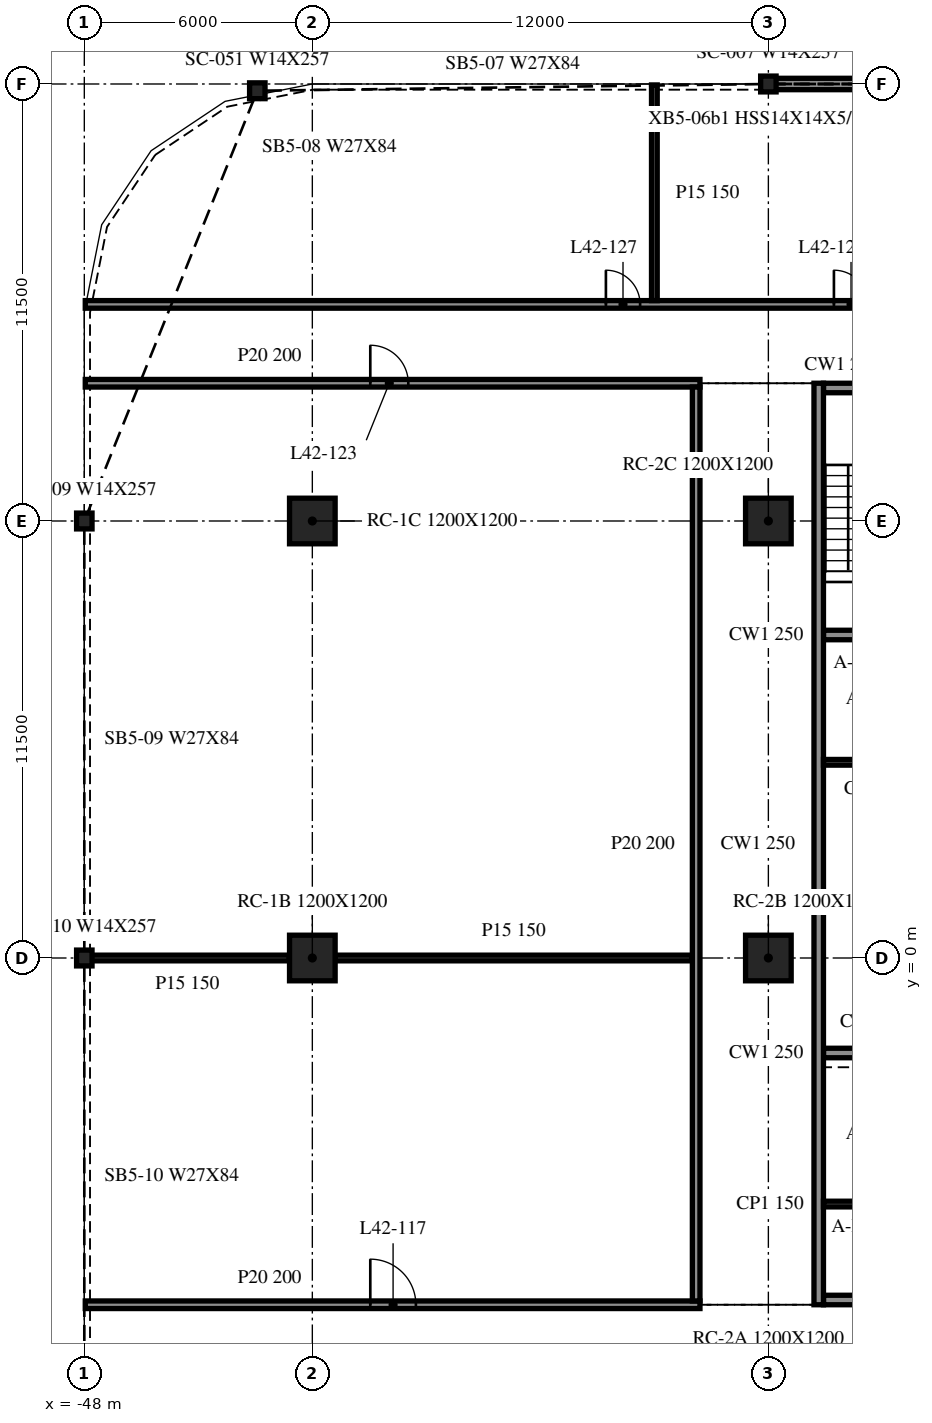
"""IFC4 building model, lengths in metres.
Left out: names, types, materials, properties, quantities, classifications, styles, units other than length and angle.
Written with IfcOpenShell. Run it as: python <this file> out.ifc"""

import sys

from ifc_helpers import new_model, si_unit, direction, frame, frame_2d, origin, origin_2d, place, context, subcontext, project, spatial, rectangle, i_section, extrude, element, fill, save


model = new_model("IFC4")
c1 = context("Model", 3, precision=1e-05, world=origin(), true_north=direction((0.0, 1.0)))
c2 = subcontext(c1, "Body", "Model", "MODEL_VIEW")
j1 = project(units=[si_unit("LENGTHUNIT", "METRE"), si_unit("PLANEANGLEUNIT", "RADIAN")], contexts=[c1])
p1 = place(None, origin())
s1 = spatial("IfcSite", under=j1, at=p1, CompositionType="ELEMENT")
p2 = place(p1, origin())
s2 = spatial("IfcBuilding", under=s1, at=p2, CompositionType="ELEMENT")
p3 = place(p2, frame((0.0, 0.0, 178.2)))
s3 = spatial("IfcBuildingStorey", under=s2, at=p3, CompositionType="ELEMENT", Elevation=178.2)
for number, where, z_axis, x_axis in (
    (1, (-42.0, 0.0, -0.34), (0.0, 0.0, 1.0), (1.0, 0.0, 0.0)),
    (2, (-42.0, 11.5, -0.34), (0.0, 0.0, 1.0), (1.0, 0.0, 0.0)),
    (3, (-30.0, 0.0, -0.34), (0.0, 0.0, 1.0), (1.0, 0.0, 0.0)),
    (4, (-30.0, 11.5, -0.34), (0.0, 0.0, 1.0), (1.0, 0.0, 0.0)),
):
    element("IfcColumn", number, at=place(p3, frame(where, z_axis=z_axis, x_axis=x_axis)), inside=s3, PredefinedType="COLUMN", context=c2, shape_type="SweptSolid", body=[
        extrude(rectangle(XDim=1.2, YDim=1.2, at=origin_2d()), origin(), (0.0, 0.0, 1.0), 3.8),
    ])
for number, where, z_axis, x_axis in (
    (5, (-30.0, 23.0, -0.34), (0.0, 0.0, 1.0), (1.0, 0.0, 0.0)),
    (6, (-43.448, 22.822, -0.34), (0.0, 0.0, 1.0), (1.0, 0.0, 0.0)),
    (7, (-48.0, 11.5, -0.34), (0.0, 0.0, 1.0), (1.0, 0.0, 0.0)),
    (8, (-48.0, 0.0, -0.34), (0.0, 0.0, 1.0), (1.0, 0.0, 0.0)),
):
    element("IfcColumn", number, at=place(p3, frame(where, z_axis=z_axis, x_axis=x_axis)), inside=s3, PredefinedType="COLUMN", context=c2, shape_type="SweptSolid", body=[
        extrude(i_section(OverallWidth=0.406, OverallDepth=0.417, WebThickness=0.03, FlangeThickness=0.048, at=origin_2d()), origin(), (0.0, 0.0, 1.0), 3.8),
    ])
p4 = place(p3, frame((-18.015, 23.0, 0.0), z_axis=(0.0, 0.0, 1.0), x_axis=(-1.0, 0.0, 0.0)))
e9 = element("IfcWall", 9, at=p4, inside=s3, PredefinedType="NOTDEFINED", context=c2, shape_type="SweptSolid", body=[
    extrude(rectangle(XDim=11.97, YDim=0.3, at=frame_2d((5.985, 0.0))), origin(), (0.0, 0.0, 1.0), 2.782),
])
p5 = place(p3, frame((-28.675, 15.125, 0.0), z_axis=(0.0, 0.0, 1.0), x_axis=(0.0, -1.0, 0.0)))
e10 = element("IfcWall", 10, at=p5, inside=s3, PredefinedType="SOLIDWALL", context=c2, shape_type="SweptSolid", body=[
    extrude(rectangle(XDim=24.25, YDim=0.25, at=frame_2d((12.125, 0.0))), origin(), (0.0, 0.0, 1.0), 3.46),
])
p6 = place(p3, frame((-19.45, -9.0, 0.0), z_axis=(0.0, 0.0, 1.0), x_axis=(-1.0, 0.0, 0.0)))
e11 = element("IfcWall", 11, at=p6, inside=s3, PredefinedType="SOLIDWALL", context=c2, shape_type="SweptSolid", body=[
    extrude(rectangle(XDim=9.1, YDim=0.25, at=frame_2d((4.55, 0.0))), origin(), (0.0, 0.0, 1.0), 3.46),
])
p7 = place(p6, frame((3.65, 0.0, 0.0)))
e12 = element("IfcOpeningElement", 12, at=p7, cuts=e11, PredefinedType="OPENING", context=c2, shape_type="SweptSolid", body=[
    extrude(rectangle(XDim=1.8, YDim=2.1, at=frame_2d((0.9, 1.05))), frame((0.0, 0.135, 0.0), z_axis=(0.0, -1.0, 0.0), x_axis=(1.0, 0.0, 0.0)), (0.0, 0.0, 1.0), 0.27),
])
p8 = place(p3, frame((-28.55, 15.0, 0.0), z_axis=(0.0, 0.0, 1.0), x_axis=(1.0, 0.0, 0.0)))
e13 = element("IfcWall", 13, at=p8, inside=s3, PredefinedType="SOLIDWALL", context=c2, shape_type="SweptSolid", body=[
    extrude(rectangle(XDim=9.1, YDim=0.25, at=frame_2d((4.55, 0.0))), origin(), (0.0, 0.0, 1.0), 3.46),
])
p9 = place(p8, frame((3.65, 0.0, 0.0)))
e14 = element("IfcOpeningElement", 14, at=p9, cuts=e13, PredefinedType="OPENING", context=c2, shape_type="SweptSolid", body=[
    extrude(rectangle(XDim=1.8, YDim=2.1, at=frame_2d((0.9, 1.05))), frame((0.0, 0.135, 0.0), z_axis=(0.0, -1.0, 0.0), x_axis=(1.0, 0.0, 0.0)), (0.0, 0.0, 1.0), 0.27),
])
for number, where, z_axis, x_axis in (
    (15, (-28.55, -2.5, 0.0), (0.0, 0.0, 1.0), (1.0, 0.0, 0.0)),
    (16, (-28.55, 8.5, 0.0), (0.0, 0.0, 1.0), (1.0, 0.0, 0.0)),
):
    element("IfcWall", number, at=place(p3, frame(where, z_axis=z_axis, x_axis=x_axis)), inside=s3, PredefinedType="SOLIDWALL", context=c2, shape_type="SweptSolid", body=[
        extrude(rectangle(XDim=2.85, YDim=0.25, at=frame_2d((1.425, 0.0))), origin(), (0.0, 0.0, 1.0), 3.46),
    ])
for number, where, z_axis, x_axis in (
    (17, (-28.55, 5.15, 0.0), (0.0, 0.0, 1.0), (1.0, 0.0, 0.0)),
    (18, (-28.55, -6.475, 0.0), (0.0, 0.0, 1.0), (1.0, 0.0, 0.0)),
):
    element("IfcWall", number, at=place(p3, frame(where, z_axis=z_axis, x_axis=x_axis)), inside=s3, PredefinedType="PARTITIONING", context=c2, shape_type="SweptSolid", body=[
        extrude(rectangle(XDim=2.85, YDim=0.15, at=frame_2d((1.425, 0.0))), origin(), (0.0, 0.0, 1.0), 3.46),
    ])
p10 = place(p3, frame((-47.975, -9.125, 0.0), z_axis=(0.0, 0.0, 1.0), x_axis=(1.0, 0.0, 0.0)))
e19 = element("IfcWall", 19, at=p10, inside=s3, PredefinedType="PARTITIONING", context=c2, shape_type="SweptSolid", body=[
    extrude(rectangle(XDim=16.175, YDim=0.2, at=frame_2d((8.087, 0.0))), origin(), (0.0, 0.0, 1.0), 3.46),
])
p11 = place(p10, frame((7.5, 0.0, 0.0)))
e20 = element("IfcOpeningElement", 20, at=p11, cuts=e19, PredefinedType="OPENING", context=c2, shape_type="SweptSolid", body=[
    extrude(rectangle(XDim=1.2, YDim=2.1, at=frame_2d((0.6, 1.05))), frame((0.0, 0.11, 0.0), z_axis=(0.0, -1.0, 0.0), x_axis=(1.0, 0.0, 0.0)), (0.0, 0.0, 1.0), 0.22),
])
p12 = place(p3, frame((-47.975, 0.0, 0.0), z_axis=(0.0, 0.0, 1.0), x_axis=(1.0, 0.0, 0.0)))
e21 = element("IfcWall", 21, at=p12, inside=s3, PredefinedType="PARTITIONING", context=c2, shape_type="SweptSolid", body=[
    extrude(rectangle(XDim=5.375, YDim=0.15, at=frame_2d((2.688, 0.0))), origin(), (0.0, 0.0, 1.0), 3.46),
])
p13 = place(p3, frame((-41.4, 0.0, 0.0), z_axis=(0.0, 0.0, 1.0), x_axis=(1.0, 0.0, 0.0)))
e22 = element("IfcWall", 22, at=p13, inside=s3, PredefinedType="PARTITIONING", context=c2, shape_type="SweptSolid", body=[
    extrude(rectangle(XDim=9.4, YDim=0.15, at=frame_2d((4.7, 0.0))), origin(), (0.0, 0.0, 1.0), 3.46),
])
p14 = place(p3, frame((-47.975, 15.125, 0.0), z_axis=(0.0, 0.0, 1.0), x_axis=(1.0, 0.0, 0.0)))
e23 = element("IfcWall", 23, at=p14, inside=s3, PredefinedType="PARTITIONING", context=c2, shape_type="SweptSolid", body=[
    extrude(rectangle(XDim=16.175, YDim=0.2, at=frame_2d((8.087, 0.0))), origin(), (0.0, 0.0, 1.0), 3.46),
])
p15 = place(p14, frame((7.5, 0.0, 0.0)))
e24 = element("IfcOpeningElement", 24, at=p15, cuts=e23, PredefinedType="OPENING", context=c2, shape_type="SweptSolid", body=[
    extrude(rectangle(XDim=1.0, YDim=2.1, at=frame_2d((0.5, 1.05))), frame((0.0, 0.11, 0.0), z_axis=(0.0, -1.0, 0.0), x_axis=(1.0, 0.0, 0.0)), (0.0, 0.0, 1.0), 0.22),
])
p16 = place(p3, frame((-47.975, 17.2, 0.0), z_axis=(0.0, 0.0, 1.0), x_axis=(1.0, 0.0, 0.0)))
e25 = element("IfcWall", 25, at=p16, inside=s3, PredefinedType="PARTITIONING", context=c2, shape_type="SweptSolid", body=[
    extrude(rectangle(XDim=95.95, YDim=0.2, at=frame_2d((47.975, 0.0))), origin(), (0.0, 0.0, 1.0), 3.46),
])
p17 = place(p16, frame((13.7, 0.0, 0.0)))
e26 = element("IfcOpeningElement", 26, at=p17, cuts=e25, PredefinedType="OPENING", context=c2, shape_type="SweptSolid", body=[
    extrude(rectangle(XDim=0.9, YDim=2.1, at=frame_2d((0.45, 1.05))), frame((0.0, 0.11, 0.0), z_axis=(0.0, -1.0, 0.0), x_axis=(1.0, 0.0, 0.0)), (0.0, 0.0, 1.0), 0.22),
])
p18 = place(p16, frame((19.7, 0.0, 0.0)))
e27 = element("IfcOpeningElement", 27, at=p18, cuts=e25, PredefinedType="OPENING", context=c2, shape_type="SweptSolid", body=[
    extrude(rectangle(XDim=0.9, YDim=2.1, at=frame_2d((0.45, 1.05))), frame((0.0, 0.11, 0.0), z_axis=(0.0, -1.0, 0.0), x_axis=(1.0, 0.0, 0.0)), (0.0, 0.0, 1.0), 0.22),
])
p19 = place(p16, frame((23.1, 0.0, 0.0)))
e28 = element("IfcOpeningElement", 28, at=p19, cuts=e25, PredefinedType="OPENING", context=c2, shape_type="SweptSolid", body=[
    extrude(rectangle(XDim=0.9, YDim=2.1, at=frame_2d((0.45, 1.05))), frame((0.0, 0.11, 0.0), z_axis=(0.0, -1.0, 0.0), x_axis=(1.0, 0.0, 0.0)), (0.0, 0.0, 1.0), 0.22),
])
p20 = place(p16, frame((25.7, 0.0, 0.0)))
e29 = element("IfcOpeningElement", 29, at=p20, cuts=e25, PredefinedType="OPENING", context=c2, shape_type="SweptSolid", body=[
    extrude(rectangle(XDim=0.9, YDim=2.1, at=frame_2d((0.45, 1.05))), frame((0.0, 0.11, 0.0), z_axis=(0.0, -1.0, 0.0), x_axis=(1.0, 0.0, 0.0)), (0.0, 0.0, 1.0), 0.22),
])
p21 = place(p16, frame((40.7, 0.0, 0.0)))
e30 = element("IfcOpeningElement", 30, at=p21, cuts=e25, PredefinedType="OPENING", context=c2, shape_type="SweptSolid", body=[
    extrude(rectangle(XDim=0.9, YDim=2.1, at=frame_2d((0.45, 1.05))), frame((0.0, 0.11, 0.0), z_axis=(0.0, -1.0, 0.0), x_axis=(1.0, 0.0, 0.0)), (0.0, 0.0, 1.0), 0.22),
])
p22 = place(p16, frame((46.7, 0.0, 0.0)))
e31 = element("IfcOpeningElement", 31, at=p22, cuts=e25, PredefinedType="OPENING", context=c2, shape_type="SweptSolid", body=[
    extrude(rectangle(XDim=0.9, YDim=2.1, at=frame_2d((0.45, 1.05))), frame((0.0, 0.11, 0.0), z_axis=(0.0, -1.0, 0.0), x_axis=(1.0, 0.0, 0.0)), (0.0, 0.0, 1.0), 0.22),
])
p23 = place(p16, frame((48.1, 0.0, 0.0)))
e32 = element("IfcOpeningElement", 32, at=p23, cuts=e25, PredefinedType="OPENING", context=c2, shape_type="SweptSolid", body=[
    extrude(rectangle(XDim=0.9, YDim=2.1, at=frame_2d((0.45, 1.05))), frame((0.0, 0.11, 0.0), z_axis=(0.0, -1.0, 0.0), x_axis=(1.0, 0.0, 0.0)), (0.0, 0.0, 1.0), 0.22),
])
p24 = place(p16, frame((51.5, 0.0, 0.0)))
e33 = element("IfcOpeningElement", 33, at=p24, cuts=e25, PredefinedType="OPENING", context=c2, shape_type="SweptSolid", body=[
    extrude(rectangle(XDim=0.9, YDim=2.1, at=frame_2d((0.45, 1.05))), frame((0.0, 0.11, 0.0), z_axis=(0.0, -1.0, 0.0), x_axis=(1.0, 0.0, 0.0)), (0.0, 0.0, 1.0), 0.22),
])
p25 = place(p16, frame((54.5, 0.0, 0.0)))
e34 = element("IfcOpeningElement", 34, at=p25, cuts=e25, PredefinedType="OPENING", context=c2, shape_type="SweptSolid", body=[
    extrude(rectangle(XDim=0.9, YDim=2.1, at=frame_2d((0.45, 1.05))), frame((0.0, 0.11, 0.0), z_axis=(0.0, -1.0, 0.0), x_axis=(1.0, 0.0, 0.0)), (0.0, 0.0, 1.0), 0.22),
])
p26 = place(p16, frame((69.1, 0.0, 0.0)))
e35 = element("IfcOpeningElement", 35, at=p26, cuts=e25, PredefinedType="OPENING", context=c2, shape_type="SweptSolid", body=[
    extrude(rectangle(XDim=0.9, YDim=2.1, at=frame_2d((0.45, 1.05))), frame((0.0, 0.11, 0.0), z_axis=(0.0, -1.0, 0.0), x_axis=(1.0, 0.0, 0.0)), (0.0, 0.0, 1.0), 0.22),
])
p27 = place(p16, frame((75.1, 0.0, 0.0)))
e36 = element("IfcOpeningElement", 36, at=p27, cuts=e25, PredefinedType="OPENING", context=c2, shape_type="SweptSolid", body=[
    extrude(rectangle(XDim=0.9, YDim=2.1, at=frame_2d((0.45, 1.05))), frame((0.0, 0.11, 0.0), z_axis=(0.0, -1.0, 0.0), x_axis=(1.0, 0.0, 0.0)), (0.0, 0.0, 1.0), 0.22),
])
p28 = place(p16, frame((78.1, 0.0, 0.0)))
e37 = element("IfcOpeningElement", 37, at=p28, cuts=e25, PredefinedType="OPENING", context=c2, shape_type="SweptSolid", body=[
    extrude(rectangle(XDim=0.9, YDim=2.1, at=frame_2d((0.45, 1.05))), frame((0.0, 0.11, 0.0), z_axis=(0.0, -1.0, 0.0), x_axis=(1.0, 0.0, 0.0)), (0.0, 0.0, 1.0), 0.22),
])
p29 = place(p16, frame((81.1, 0.0, 0.0)))
e38 = element("IfcOpeningElement", 38, at=p29, cuts=e25, PredefinedType="OPENING", context=c2, shape_type="SweptSolid", body=[
    extrude(rectangle(XDim=0.9, YDim=2.1, at=frame_2d((0.45, 1.05))), frame((0.0, 0.11, 0.0), z_axis=(0.0, -1.0, 0.0), x_axis=(1.0, 0.0, 0.0)), (0.0, 0.0, 1.0), 0.22),
])
p30 = place(p3, frame((-33.0, 17.3, 0.0), z_axis=(0.0, 0.0, 1.0), x_axis=(0.0, 1.0, 0.0)))
e39 = element("IfcWall", 39, at=p30, inside=s3, PredefinedType="PARTITIONING", context=c2, shape_type="SweptSolid", body=[
    extrude(rectangle(XDim=5.675, YDim=0.15, at=frame_2d((2.837, 0.0))), origin(), (0.0, 0.0, 1.0), 3.46),
])
p31 = place(p3, frame((-31.9, -9.025, 0.0), z_axis=(0.0, 0.0, 1.0), x_axis=(0.0, 1.0, 0.0)))
e40 = element("IfcWall", 40, at=p31, inside=s3, PredefinedType="PARTITIONING", context=c2, shape_type="SweptSolid", body=[
    extrude(rectangle(XDim=24.05, YDim=0.2, at=frame_2d((12.025, 0.0))), origin(), (0.0, 0.0, 1.0), 3.46),
])
p32 = place(p11, origin())
e41 = element("IfcDoor", 41, at=p32, inside=s3, OperationType="SINGLE_SWING_RIGHT", PredefinedType="DOOR", context=c2, shape_type="SweptSolid", body=[
    extrude(rectangle(XDim=1.2, YDim=2.1, at=frame_2d((0.6, 1.05))), frame((0.0, 0.025, 0.0), z_axis=(0.0, -1.0, 0.0), x_axis=(1.0, 0.0, 0.0)), (0.0, 0.0, 1.0), 0.05),
])
fill(e20, e41)
p33 = place(p15, origin())
e42 = element("IfcDoor", 42, at=p33, inside=s3, OperationType="SINGLE_SWING_RIGHT", PredefinedType="DOOR", context=c2, shape_type="SweptSolid", body=[
    extrude(rectangle(XDim=1.0, YDim=2.1, at=frame_2d((0.5, 1.05))), frame((0.0, 0.025, 0.0), z_axis=(0.0, -1.0, 0.0), x_axis=(1.0, 0.0, 0.0)), (0.0, 0.0, 1.0), 0.05),
])
fill(e24, e42)
p34 = place(p17, origin())
e43 = element("IfcDoor", 43, at=p34, inside=s3, OperationType="SINGLE_SWING_LEFT", PredefinedType="DOOR", context=c2, shape_type="SweptSolid", body=[
    extrude(rectangle(XDim=0.9, YDim=2.1, at=frame_2d((0.45, 1.05))), frame((0.0, 0.025, 0.0), z_axis=(0.0, -1.0, 0.0), x_axis=(1.0, 0.0, 0.0)), (0.0, 0.0, 1.0), 0.05),
])
fill(e26, e43)
p35 = place(p18, origin())
e44 = element("IfcDoor", 44, at=p35, inside=s3, OperationType="SINGLE_SWING_LEFT", PredefinedType="DOOR", context=c2, shape_type="SweptSolid", body=[
    extrude(rectangle(XDim=0.9, YDim=2.1, at=frame_2d((0.45, 1.05))), frame((0.0, 0.025, 0.0), z_axis=(0.0, -1.0, 0.0), x_axis=(1.0, 0.0, 0.0)), (0.0, 0.0, 1.0), 0.05),
])
fill(e27, e44)
save(model, sys.argv[1])
